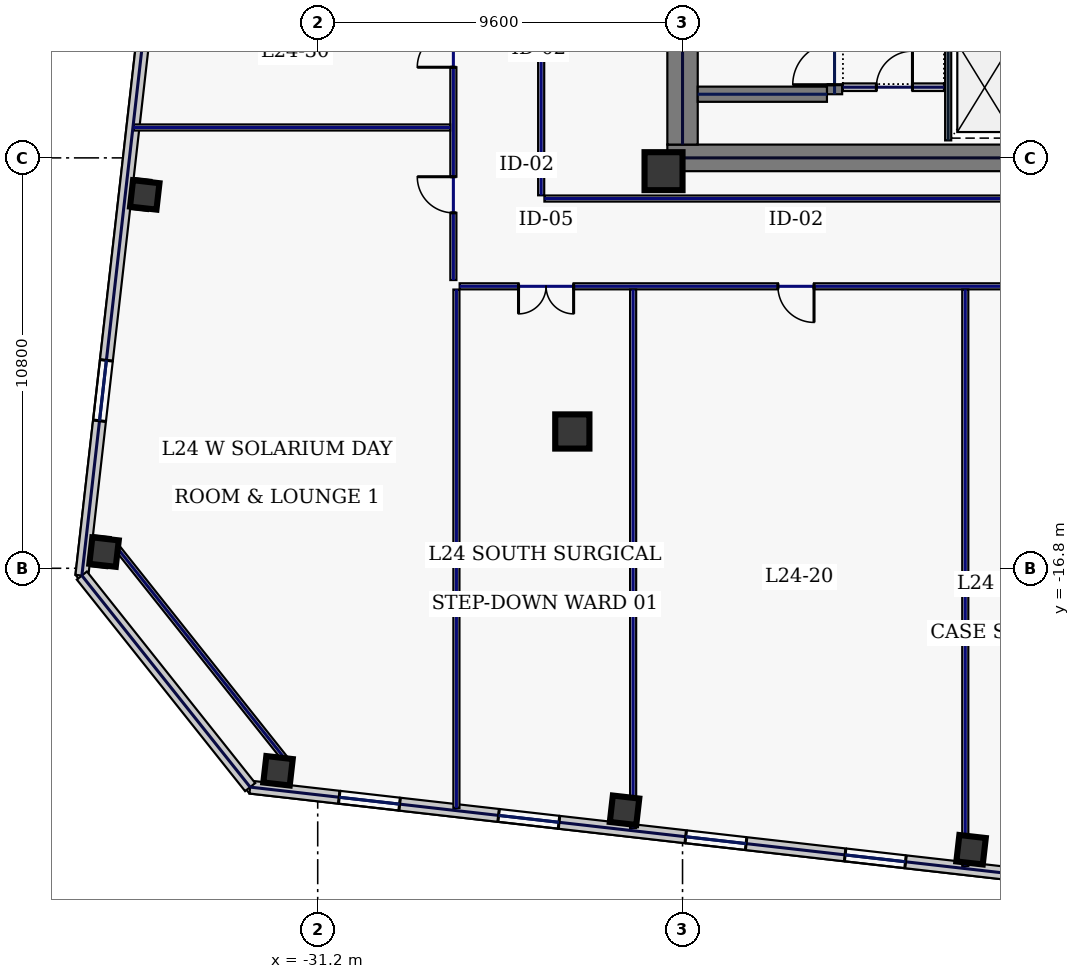
"""IFC4 building model, lengths in metres.
Left out: names, types, materials, properties, quantities, classifications, styles, units other than length and angle.
Written with IfcOpenShell. Run it as: python <this file> out.ifc"""

import sys

from ifc_helpers import new_model, si_unit, direction, frame, frame_2d, origin, origin_2d, place, context, subcontext, project, spatial, rectangle, hollow_rectangle, extrude, element, fill, save


model = new_model("IFC4")
c1 = context("Model", 3, precision=1e-05, world=origin(), true_north=direction((0.0, 1.0)))
c2 = subcontext(c1, "Body", "Model", "MODEL_VIEW")
j1 = project(units=[si_unit("LENGTHUNIT", "METRE"), si_unit("PLANEANGLEUNIT", "RADIAN")], contexts=[c1])
p1 = place(None, origin())
s1 = spatial("IfcSite", under=j1, at=p1, CompositionType="ELEMENT")
p2 = place(p1, origin())
s2 = spatial("IfcBuilding", under=s1, at=p2, CompositionType="ELEMENT")
p3 = place(p2, frame((0.0, 0.0, 109.4)))
s3 = spatial("IfcBuildingStorey", under=s2, at=p3, CompositionType="ELEMENT", Elevation=109.4)
p4 = place(p3, frame((-22.0, -6.0, 0.0), z_axis=(0.0, 0.0, 1.0), x_axis=(1.0, 0.0, 0.0)))
e1 = element("IfcWall", 1, at=p4, inside=s3, PredefinedType="SHEAR", context=c2, shape_type="SweptSolid", body=[
    extrude(rectangle(XDim=11.55, YDim=0.7, at=frame_2d((5.775, 0.0))), origin(), (0.0, 0.0, 1.0), 3.74),
])
p5 = place(p3, frame((-21.6, -5.65, 0.0), z_axis=(0.0, 0.0, 1.0), x_axis=(0.0, 1.0, 0.0)))
e2 = element("IfcWall", 2, at=p5, inside=s3, PredefinedType="SHEAR", context=c2, shape_type="SweptSolid", body=[
    extrude(rectangle(XDim=11.3, YDim=0.8, at=frame_2d((5.65, 0.0))), origin(), (0.0, 0.0, 1.0), 3.74),
])
p6 = place(p3, frame((-17.6, -4.325, 0.0), z_axis=(0.0, 0.0, 1.0), x_axis=(0.0, 1.0, 0.0)))
e3 = element("IfcWall", 3, at=p6, inside=s3, PredefinedType="SHEAR", context=c2, shape_type="SweptSolid", body=[
    extrude(rectangle(XDim=8.65, YDim=0.4, at=frame_2d((4.325, 0.0))), origin(), (0.0, 0.0, 1.0), 3.74),
])
p7 = place(p6, frame((0.25, 0.0, 0.0)))
e4 = element("IfcOpeningElement", 4, at=p7, cuts=e3, PredefinedType="OPENING", context=c2, shape_type="SweptSolid", body=[
    extrude(rectangle(XDim=1.1, YDim=2.2, at=frame_2d((0.55, 1.1))), frame((0.0, 0.21, 0.0), z_axis=(0.0, -1.0, 0.0), x_axis=(1.0, 0.0, 0.0)), (0.0, 0.0, 1.0), 0.42),
])
p8 = place(p3, frame((-21.2, -4.325, 0.0), z_axis=(0.0, 0.0, 1.0), x_axis=(1.0, 0.0, 0.0)))
e5 = element("IfcWall", 5, at=p8, inside=s3, PredefinedType="SHEAR", context=c2, shape_type="SweptSolid", body=[
    extrude(rectangle(XDim=3.4, YDim=0.4, at=frame_2d((1.7, 0.0))), origin(), (0.0, 0.0, 1.0), 3.74),
])
p9 = place(p3, frame((-22.1, -6.35, 0.0), z_axis=(0.0, 0.0, 1.0), x_axis=(1.0, 0.0, 0.0)))
e6 = element("IfcColumn", 6, at=p9, inside=s3, PredefinedType="COLUMN", context=c2, shape_type="SweptSolid", body=[
    extrude(hollow_rectangle(XDim=1.0, YDim=1.0, WallThickness=0.045, at=origin_2d()), origin(), (0.0, 0.0, 1.0), 3.74),
])
p10 = place(p3, frame((-24.5, -13.2, 0.0), z_axis=(0.0, 0.0, 1.0), x_axis=(1.0, 0.0, 0.0)))
e7 = element("IfcColumn", 7, at=p10, inside=s3, PredefinedType="COLUMN", context=c2, shape_type="SweptSolid", body=[
    extrude(hollow_rectangle(XDim=0.9, YDim=0.9, WallThickness=0.04, at=origin_2d()), origin(), (0.0, 0.0, 1.0), 3.74),
])
for number, where, z_axis, x_axis in (
    (8, (-32.244, -22.129, 0.0), (0.0, 0.0, 1.0), (0.994, -0.113, 0.0)),
    (9, (-23.126, -23.168, 0.0), (0.0, 0.0, 1.0), (0.994, -0.113, 0.0)),
    (10, (-14.008, -24.207, 0.0), (0.0, 0.0, 1.0), (0.994, -0.113, 0.0)),
    (11, (-35.751, -6.974, 0.0), (0.0, 0.0, 1.0), (0.994, -0.113, 0.0)),
    (12, (-36.822, -16.374, 0.0), (0.0, 0.0, 1.0), (0.994, -0.113, 0.0)),
):
    element("IfcColumn", number, at=place(p3, frame(where, z_axis=z_axis, x_axis=x_axis)), inside=s3, PredefinedType="COLUMN", context=c2, shape_type="SweptSolid", body=[
        extrude(hollow_rectangle(XDim=0.7, YDim=0.7, WallThickness=0.032, at=origin_2d()), origin(), (0.0, 0.0, 1.0), 3.74),
    ])
p11 = place(p3, frame((-32.977, -22.559, 0.0), z_axis=(0.0, 0.0, 1.0), x_axis=(0.993571214605, -0.113208840243, 0.0)))
e13 = element("IfcWall", 13, at=p11, inside=s3, PredefinedType="STANDARD", context=c2, shape_type="SweptSolid", body=[
    extrude(rectangle(XDim=21.223, YDim=0.34, at=frame_2d((10.611, 0.0))), origin(), (0.0, 0.0, 1.0), 3.74),
])
p12 = place(p11, frame((2.358, 0.0, 0.22)))
e14 = element("IfcOpeningElement", 14, at=p12, cuts=e13, PredefinedType="OPENING", context=c2, shape_type="SweptSolid", body=[
    extrude(rectangle(XDim=1.6, YDim=1.2, at=frame_2d((0.8, 0.6))), frame((0.0, 0.18, 0.0), z_axis=(0.0, -1.0, 0.0), x_axis=(1.0, 0.0, 0.0)), (0.0, 0.0, 1.0), 0.36),
])
p13 = place(p11, frame((6.579, 0.0, 0.22)))
e15 = element("IfcOpeningElement", 15, at=p13, cuts=e13, PredefinedType="OPENING", context=c2, shape_type="SweptSolid", body=[
    extrude(rectangle(XDim=1.6, YDim=1.2, at=frame_2d((0.8, 0.6))), frame((0.0, 0.18, 0.0), z_axis=(0.0, -1.0, 0.0), x_axis=(1.0, 0.0, 0.0)), (0.0, 0.0, 1.0), 0.36),
])
p14 = place(p11, frame((11.535, 0.0, 0.22)))
e16 = element("IfcOpeningElement", 16, at=p14, cuts=e13, PredefinedType="OPENING", context=c2, shape_type="SweptSolid", body=[
    extrude(rectangle(XDim=1.6, YDim=1.2, at=frame_2d((0.8, 0.6))), frame((0.0, 0.18, 0.0), z_axis=(0.0, -1.0, 0.0), x_axis=(1.0, 0.0, 0.0)), (0.0, 0.0, 1.0), 0.36),
])
p15 = place(p11, frame((15.756, 0.0, 0.22)))
e17 = element("IfcOpeningElement", 17, at=p15, cuts=e13, PredefinedType="OPENING", context=c2, shape_type="SweptSolid", body=[
    extrude(rectangle(XDim=1.6, YDim=1.2, at=frame_2d((0.8, 0.6))), frame((0.0, 0.18, 0.0), z_axis=(0.0, -1.0, 0.0), x_axis=(1.0, 0.0, 0.0)), (0.0, 0.0, 1.0), 0.36),
])
p16 = place(p3, frame((-32.968, 21.957, 0.0), z_axis=(0.0, 0.0, 1.0), x_axis=(-0.113201605824, -0.993572038877, 0.0)))
e18 = element("IfcWall", 18, at=p16, inside=s3, PredefinedType="STANDARD", context=c2, shape_type="SweptSolid", body=[
    extrude(rectangle(XDim=39.2, YDim=0.34, at=frame_2d((19.6, 0.0))), origin(), (0.0, 0.0, 1.0), 3.74),
])
p17 = place(p16, frame((4.1, 0.0, 0.22)))
e19 = element("IfcOpeningElement", 19, at=p17, cuts=e18, PredefinedType="OPENING", context=c2, shape_type="SweptSolid", body=[
    extrude(rectangle(XDim=1.6, YDim=1.2, at=frame_2d((0.8, 0.6))), frame((0.0, 0.18, 0.0), z_axis=(0.0, -1.0, 0.0), x_axis=(1.0, 0.0, 0.0)), (0.0, 0.0, 1.0), 0.36),
])
p18 = place(p16, frame((13.9, 0.0, 0.22)))
e20 = element("IfcOpeningElement", 20, at=p18, cuts=e18, PredefinedType="OPENING", context=c2, shape_type="SweptSolid", body=[
    extrude(rectangle(XDim=1.6, YDim=1.2, at=frame_2d((0.8, 0.6))), frame((0.0, 0.18, 0.0), z_axis=(0.0, -1.0, 0.0), x_axis=(1.0, 0.0, 0.0)), (0.0, 0.0, 1.0), 0.36),
])
p19 = place(p16, frame((33.5, 0.0, 0.22)))
e21 = element("IfcOpeningElement", 21, at=p19, cuts=e18, PredefinedType="OPENING", context=c2, shape_type="SweptSolid", body=[
    extrude(rectangle(XDim=1.6, YDim=1.2, at=frame_2d((0.8, 0.6))), frame((0.0, 0.18, 0.0), z_axis=(0.0, -1.0, 0.0), x_axis=(1.0, 0.0, 0.0)), (0.0, 0.0, 1.0), 0.36),
])
p20 = place(p3, frame((-37.406, -16.991, 0.0), z_axis=(0.0, 0.0, 1.0), x_axis=(0.622507800567, -0.78261359446, 0.0)))
e22 = element("IfcWall", 22, at=p20, inside=s3, PredefinedType="STANDARD", context=c2, shape_type="SweptSolid", body=[
    extrude(rectangle(XDim=7.114, YDim=0.34, at=frame_2d((3.557, 0.0))), origin(), (0.0, 0.0, 1.0), 3.74),
])
p21 = place(p3, frame((-14.61, -5.54, 0.0), z_axis=(0.0, 0.0, 1.0), x_axis=(0.0, 1.0, 0.0)))
e23 = element("IfcWall", 23, at=p21, inside=s3, PredefinedType="PARTITIONING", context=c2, shape_type="SweptSolid", body=[
    extrude(rectangle(XDim=2.7, YDim=0.16, at=frame_2d((1.35, 0.0))), origin(), (0.0, 0.0, 1.0), 3.74),
])
p22 = place(p3, frame((-17.38, -4.14, 0.0), z_axis=(0.0, 0.0, 1.0), x_axis=(1.0, 0.0, 0.0)))
e24 = element("IfcWall", 24, at=p22, inside=s3, PredefinedType="SOLIDWALL", context=c2, shape_type="SweptSolid", body=[
    extrude(rectangle(XDim=2.66, YDim=0.2, at=frame_2d((1.33, 0.0))), origin(), (0.0, 0.0, 1.0), 3.74),
])
p23 = place(p22, frame((0.88, 0.0, 0.0)))
e25 = element("IfcOpeningElement", 25, at=p23, cuts=e24, PredefinedType="OPENING", context=c2, shape_type="SweptSolid", body=[
    extrude(rectangle(XDim=0.95, YDim=2.2, at=frame_2d((0.475, 1.1))), frame((0.0, 0.11, 0.0), z_axis=(0.0, -1.0, 0.0), x_axis=(1.0, 0.0, 0.0)), (0.0, 0.0, 1.0), 0.22),
])
p24 = place(p3, frame((-36.556, -16.162, 0.0), z_axis=(0.0, 0.0, 1.0), x_axis=(0.622522641622, -0.782601789334, 0.0)))
e26 = element("IfcWall", 26, at=p24, inside=s3, PredefinedType="PARTITIONING", context=c2, shape_type="SweptSolid", body=[
    extrude(rectangle(XDim=7.354, YDim=0.16, at=frame_2d((3.677, 0.0))), origin(), (0.0, 0.0, 1.0), 1.535),
])
p25 = place(p3, frame((-27.63, -9.215, 0.0), z_axis=(0.0, 0.0, 1.0), x_axis=(0.0, 1.0, 0.0)))
e27 = element("IfcWall", 27, at=p25, inside=s3, PredefinedType="PARTITIONING", context=c2, shape_type="SweptSolid", body=[
    extrude(rectangle(XDim=18.63, YDim=0.16, at=frame_2d((9.315, 0.0))), origin(), (0.0, 0.0, 1.0), 3.74),
])
p26 = place(p25, frame((1.769, 0.0, 0.0)))
e28 = element("IfcOpeningElement", 28, at=p26, cuts=e27, PredefinedType="OPENING", context=c2, shape_type="SweptSolid", body=[
    extrude(rectangle(XDim=0.95, YDim=2.2, at=frame_2d((0.475, 1.1))), frame((0.0, 0.09, 0.0), z_axis=(0.0, -1.0, 0.0), x_axis=(1.0, 0.0, 0.0)), (0.0, 0.0, 1.0), 0.18),
])
p27 = place(p25, frame((5.6, 0.0, 0.0)))
e29 = element("IfcOpeningElement", 29, at=p27, cuts=e27, PredefinedType="OPENING", context=c2, shape_type="SweptSolid", body=[
    extrude(rectangle(XDim=0.95, YDim=2.2, at=frame_2d((0.475, 1.1))), frame((0.0, 0.09, 0.0), z_axis=(0.0, -1.0, 0.0), x_axis=(1.0, 0.0, 0.0)), (0.0, 0.0, 1.0), 0.18),
])
p28 = place(p25, frame((11.1, 0.0, 0.0)))
e30 = element("IfcOpeningElement", 30, at=p28, cuts=e27, PredefinedType="OPENING", context=c2, shape_type="SweptSolid", body=[
    extrude(rectangle(XDim=0.95, YDim=2.2, at=frame_2d((0.475, 1.1))), frame((0.0, 0.09, 0.0), z_axis=(0.0, -1.0, 0.0), x_axis=(1.0, 0.0, 0.0)), (0.0, 0.0, 1.0), 0.18),
])
p29 = place(p25, frame((15.981, 0.0, 0.0)))
e31 = element("IfcOpeningElement", 31, at=p29, cuts=e27, PredefinedType="OPENING", context=c2, shape_type="SweptSolid", body=[
    extrude(rectangle(XDim=0.95, YDim=2.2, at=frame_2d((0.475, 1.1))), frame((0.0, 0.09, 0.0), z_axis=(0.0, -1.0, 0.0), x_axis=(1.0, 0.0, 0.0)), (0.0, 0.0, 1.0), 0.18),
])
p30 = place(p3, frame((27.465, -9.38, 0.0), z_axis=(0.0, 0.0, 1.0), x_axis=(-1.0, 0.0, 0.0)))
e32 = element("IfcWall", 32, at=p30, inside=s3, PredefinedType="PARTITIONING", context=c2, shape_type="SweptSolid", body=[
    extrude(rectangle(XDim=54.93, YDim=0.16, at=frame_2d((27.465, 0.0))), origin(), (0.0, 0.0, 1.0), 3.74),
])
p31 = place(p30, frame((51.931, 0.0, 0.0)))
e33 = element("IfcOpeningElement", 33, at=p31, cuts=e32, PredefinedType="OPENING", context=c2, shape_type="SweptSolid", body=[
    extrude(rectangle(XDim=1.45, YDim=2.2, at=frame_2d((0.725, 1.1))), frame((0.0, 0.09, 0.0), z_axis=(0.0, -1.0, 0.0), x_axis=(1.0, 0.0, 0.0)), (0.0, 0.0, 1.0), 0.18),
])
p32 = place(p30, frame((45.605, 0.0, 0.0)))
e34 = element("IfcOpeningElement", 34, at=p32, cuts=e32, PredefinedType="OPENING", context=c2, shape_type="SweptSolid", body=[
    extrude(rectangle(XDim=0.95, YDim=2.2, at=frame_2d((0.475, 1.1))), frame((0.0, 0.09, 0.0), z_axis=(0.0, -1.0, 0.0), x_axis=(1.0, 0.0, 0.0)), (0.0, 0.0, 1.0), 0.18),
])
p33 = place(p30, frame((38.485, 0.0, 0.0)))
e35 = element("IfcOpeningElement", 35, at=p33, cuts=e32, PredefinedType="OPENING", context=c2, shape_type="SweptSolid", body=[
    extrude(rectangle(XDim=0.95, YDim=2.2, at=frame_2d((0.475, 1.1))), frame((0.0, 0.09, 0.0), z_axis=(0.0, -1.0, 0.0), x_axis=(1.0, 0.0, 0.0)), (0.0, 0.0, 1.0), 0.18),
])
p34 = place(p30, frame((33.435, 0.0, 0.0)))
e36 = element("IfcOpeningElement", 36, at=p34, cuts=e32, PredefinedType="OPENING", context=c2, shape_type="SweptSolid", body=[
    extrude(rectangle(XDim=1.05, YDim=2.2, at=frame_2d((0.525, 1.1))), frame((0.0, 0.09, 0.0), z_axis=(0.0, -1.0, 0.0), x_axis=(1.0, 0.0, 0.0)), (0.0, 0.0, 1.0), 0.18),
])
p35 = place(p30, frame((27.435, 0.0, 0.0)))
e37 = element("IfcOpeningElement", 37, at=p35, cuts=e32, PredefinedType="OPENING", context=c2, shape_type="SweptSolid", body=[
    extrude(rectangle(XDim=0.95, YDim=2.2, at=frame_2d((0.475, 1.1))), frame((0.0, 0.09, 0.0), z_axis=(0.0, -1.0, 0.0), x_axis=(1.0, 0.0, 0.0)), (0.0, 0.0, 1.0), 0.18),
])
p36 = place(p30, frame((20.03, 0.0, 0.0)))
e38 = element("IfcOpeningElement", 38, at=p36, cuts=e32, PredefinedType="OPENING", context=c2, shape_type="SweptSolid", body=[
    extrude(rectangle(XDim=1.3, YDim=2.2, at=frame_2d((0.65, 1.1))), frame((0.0, 0.09, 0.0), z_axis=(0.0, -1.0, 0.0), x_axis=(1.0, 0.0, 0.0)), (0.0, 0.0, 1.0), 0.18),
])
p37 = place(p30, frame((14.175, 0.0, 0.0)))
e39 = element("IfcOpeningElement", 39, at=p37, cuts=e32, PredefinedType="OPENING", context=c2, shape_type="SweptSolid", body=[
    extrude(rectangle(XDim=1.45, YDim=2.2, at=frame_2d((0.725, 1.1))), frame((0.0, 0.09, 0.0), z_axis=(0.0, -1.0, 0.0), x_axis=(1.0, 0.0, 0.0)), (0.0, 0.0, 1.0), 0.18),
])
p38 = place(p30, frame((10.15, 0.0, 0.0)))
e40 = element("IfcOpeningElement", 40, at=p38, cuts=e32, PredefinedType="OPENING", context=c2, shape_type="SweptSolid", body=[
    extrude(rectangle(XDim=1.15, YDim=2.2, at=frame_2d((0.575, 1.1))), frame((0.0, 0.09, 0.0), z_axis=(0.0, -1.0, 0.0), x_axis=(1.0, 0.0, 0.0)), (0.0, 0.0, 1.0), 0.18),
])
p39 = place(p30, frame((6.225, 0.0, 0.0)))
e41 = element("IfcOpeningElement", 41, at=p39, cuts=e32, PredefinedType="OPENING", context=c2, shape_type="SweptSolid", body=[
    extrude(rectangle(XDim=1.05, YDim=2.2, at=frame_2d((0.525, 1.1))), frame((0.0, 0.09, 0.0), z_axis=(0.0, -1.0, 0.0), x_axis=(1.0, 0.0, 0.0)), (0.0, 0.0, 1.0), 0.18),
])
p40 = place(p30, frame((2.044, 0.0, 0.0)))
e42 = element("IfcOpeningElement", 42, at=p40, cuts=e32, PredefinedType="OPENING", context=c2, shape_type="SweptSolid", body=[
    extrude(rectangle(XDim=0.95, YDim=2.2, at=frame_2d((0.475, 1.1))), frame((0.0, 0.09, 0.0), z_axis=(0.0, -1.0, 0.0), x_axis=(1.0, 0.0, 0.0)), (0.0, 0.0, 1.0), 0.18),
])
p41 = place(p3, frame((-25.32, 7.185, 0.0), z_axis=(0.0, 0.0, 1.0), x_axis=(0.0, -1.0, 0.0)))
e43 = element("IfcWall", 43, at=p41, inside=s3, PredefinedType="PARTITIONING", context=c2, shape_type="SweptSolid", body=[
    extrude(rectangle(XDim=14.17, YDim=0.16, at=frame_2d((7.085, 0.0))), origin(), (0.0, 0.0, 1.0), 3.74),
])
p42 = place(p3, frame((-25.235, -7.07, 0.0), z_axis=(0.0, 0.0, 1.0), x_axis=(1.0, 0.0, 0.0)))
e44 = element("IfcWall", 44, at=p42, inside=s3, PredefinedType="PARTITIONING", context=c2, shape_type="SweptSolid", body=[
    extrude(rectangle(XDim=14.57, YDim=0.16, at=frame_2d((7.285, 0.0))), origin(), (0.0, 0.0, 1.0), 3.74),
])
p43 = place(p3, frame((-27.55, -23.106, 0.0), z_axis=(0.0, 0.0, 1.0), x_axis=(0.0, 1.0, 0.0)))
e45 = element("IfcWall", 45, at=p43, inside=s3, PredefinedType="PARTITIONING", context=c2, shape_type="SweptSolid", body=[
    extrude(rectangle(XDim=13.641, YDim=0.16, at=frame_2d((6.821, 0.0))), origin(), (0.0, 0.0, 1.0), 3.74),
])
p44 = place(p3, frame((-22.9, -23.636, 0.0), z_axis=(0.0, 0.0, 1.0), x_axis=(0.0, 1.0, 0.0)))
e46 = element("IfcWall", 46, at=p44, inside=s3, PredefinedType="PARTITIONING", context=c2, shape_type="SweptSolid", body=[
    extrude(rectangle(XDim=14.171, YDim=0.16, at=frame_2d((7.085, 0.0))), origin(), (0.0, 0.0, 1.0), 3.74),
])
p45 = place(p3, frame((-14.16, -24.632, 0.0), z_axis=(0.0, 0.0, 1.0), x_axis=(0.0, 1.0, 0.0)))
e47 = element("IfcWall", 47, at=p45, inside=s3, PredefinedType="PARTITIONING", context=c2, shape_type="SweptSolid", body=[
    extrude(rectangle(XDim=15.167, YDim=0.16, at=frame_2d((7.583, 0.0))), origin(), (0.0, 0.0, 1.0), 3.74),
])
p46 = place(p3, frame((-36.042, -5.2, 0.0), z_axis=(0.0, 0.0, 1.0), x_axis=(1.0, 0.0, 0.0)))
e48 = element("IfcWall", 48, at=p46, inside=s3, PredefinedType="PARTITIONING", context=c2, shape_type="SweptSolid", body=[
    extrude(rectangle(XDim=8.327, YDim=0.16, at=frame_2d((4.164, 0.0))), origin(), (0.0, 0.0, 1.0), 3.74),
])
p47 = place(p12, origin())
e49 = element("IfcWindow", 49, at=p47, inside=s3, PartitioningType="SINGLE_PANEL", PredefinedType="WINDOW", context=c2, shape_type="SweptSolid", body=[
    extrude(rectangle(XDim=1.6, YDim=1.2, at=frame_2d((0.8, 0.6))), frame((0.0, 0.03, 0.0), z_axis=(0.0, -1.0, 0.0), x_axis=(1.0, 0.0, 0.0)), (0.0, 0.0, 1.0), 0.06),
])
fill(e14, e49)
p48 = place(p13, origin())
e50 = element("IfcWindow", 50, at=p48, inside=s3, PartitioningType="SINGLE_PANEL", PredefinedType="WINDOW", context=c2, shape_type="SweptSolid", body=[
    extrude(rectangle(XDim=1.6, YDim=1.2, at=frame_2d((0.8, 0.6))), frame((0.0, 0.03, 0.0), z_axis=(0.0, -1.0, 0.0), x_axis=(1.0, 0.0, 0.0)), (0.0, 0.0, 1.0), 0.06),
])
fill(e15, e50)
p49 = place(p14, origin())
e51 = element("IfcWindow", 51, at=p49, inside=s3, PartitioningType="SINGLE_PANEL", PredefinedType="WINDOW", context=c2, shape_type="SweptSolid", body=[
    extrude(rectangle(XDim=1.6, YDim=1.2, at=frame_2d((0.8, 0.6))), frame((0.0, 0.03, 0.0), z_axis=(0.0, -1.0, 0.0), x_axis=(1.0, 0.0, 0.0)), (0.0, 0.0, 1.0), 0.06),
])
fill(e16, e51)
p50 = place(p15, origin())
e52 = element("IfcWindow", 52, at=p50, inside=s3, PartitioningType="SINGLE_PANEL", PredefinedType="WINDOW", context=c2, shape_type="SweptSolid", body=[
    extrude(rectangle(XDim=1.6, YDim=1.2, at=frame_2d((0.8, 0.6))), frame((0.0, 0.03, 0.0), z_axis=(0.0, -1.0, 0.0), x_axis=(1.0, 0.0, 0.0)), (0.0, 0.0, 1.0), 0.06),
])
fill(e17, e52)
p51 = place(p19, origin())
e53 = element("IfcWindow", 53, at=p51, inside=s3, PartitioningType="SINGLE_PANEL", PredefinedType="WINDOW", context=c2, shape_type="SweptSolid", body=[
    extrude(rectangle(XDim=1.6, YDim=1.2, at=frame_2d((0.8, 0.6))), frame((0.0, 0.03, 0.0), z_axis=(0.0, -1.0, 0.0), x_axis=(1.0, 0.0, 0.0)), (0.0, 0.0, 1.0), 0.06),
])
fill(e21, e53)
p52 = place(p7, origin())
e54 = element("IfcDoor", 54, at=p52, inside=s3, OperationType="SINGLE_SWING_LEFT", PredefinedType="DOOR", context=c2, shape_type="SweptSolid", body=[
    extrude(rectangle(XDim=1.1, YDim=2.2, at=frame_2d((0.55, 1.1))), frame((0.0, 0.025, 0.0), z_axis=(0.0, -1.0, 0.0), x_axis=(1.0, 0.0, 0.0)), (0.0, 0.0, 1.0), 0.05),
])
fill(e4, e54)
p53 = place(p23, origin())
e55 = element("IfcDoor", 55, at=p53, inside=s3, OperationType="SINGLE_SWING_RIGHT", PredefinedType="DOOR", context=c2, shape_type="SweptSolid", body=[
    extrude(rectangle(XDim=0.95, YDim=2.2, at=frame_2d((0.475, 1.1))), frame((0.0, 0.025, 0.0), z_axis=(0.0, -1.0, 0.0), x_axis=(1.0, 0.0, 0.0)), (0.0, 0.0, 1.0), 0.05),
])
fill(e25, e55)
p54 = place(p31, origin())
e56 = element("IfcDoor", 56, at=p54, inside=s3, OperationType="DOUBLE_SWING_LEFT", PredefinedType="DOOR", context=c2, shape_type="SweptSolid", body=[
    extrude(rectangle(XDim=1.45, YDim=2.2, at=frame_2d((0.725, 1.1))), frame((0.0, 0.025, 0.0), z_axis=(0.0, -1.0, 0.0), x_axis=(1.0, 0.0, 0.0)), (0.0, 0.0, 1.0), 0.05),
])
fill(e33, e56)
p55 = place(p32, origin())
e57 = element("IfcDoor", 57, at=p55, inside=s3, OperationType="SINGLE_SWING_LEFT", PredefinedType="DOOR", context=c2, shape_type="SweptSolid", body=[
    extrude(rectangle(XDim=0.95, YDim=2.2, at=frame_2d((0.475, 1.1))), frame((0.0, 0.025, 0.0), z_axis=(0.0, -1.0, 0.0), x_axis=(1.0, 0.0, 0.0)), (0.0, 0.0, 1.0), 0.05),
])
fill(e34, e57)
p56 = place(p26, origin())
e58 = element("IfcDoor", 58, at=p56, inside=s3, OperationType="SINGLE_SWING_RIGHT", PredefinedType="DOOR", context=c2, shape_type="SweptSolid", body=[
    extrude(rectangle(XDim=0.95, YDim=2.2, at=frame_2d((0.475, 1.1))), frame((0.0, 0.025, 0.0), z_axis=(0.0, -1.0, 0.0), x_axis=(1.0, 0.0, 0.0)), (0.0, 0.0, 1.0), 0.05),
])
fill(e28, e58)
p57 = place(p27, origin())
e59 = element("IfcDoor", 59, at=p57, inside=s3, OperationType="SINGLE_SWING_LEFT", PredefinedType="DOOR", context=c2, shape_type="SweptSolid", body=[
    extrude(rectangle(XDim=0.95, YDim=2.2, at=frame_2d((0.475, 1.1))), frame((0.0, 0.025, 0.0), z_axis=(0.0, -1.0, 0.0), x_axis=(1.0, 0.0, 0.0)), (0.0, 0.0, 1.0), 0.05),
])
fill(e29, e59)
save(model, sys.argv[1])
